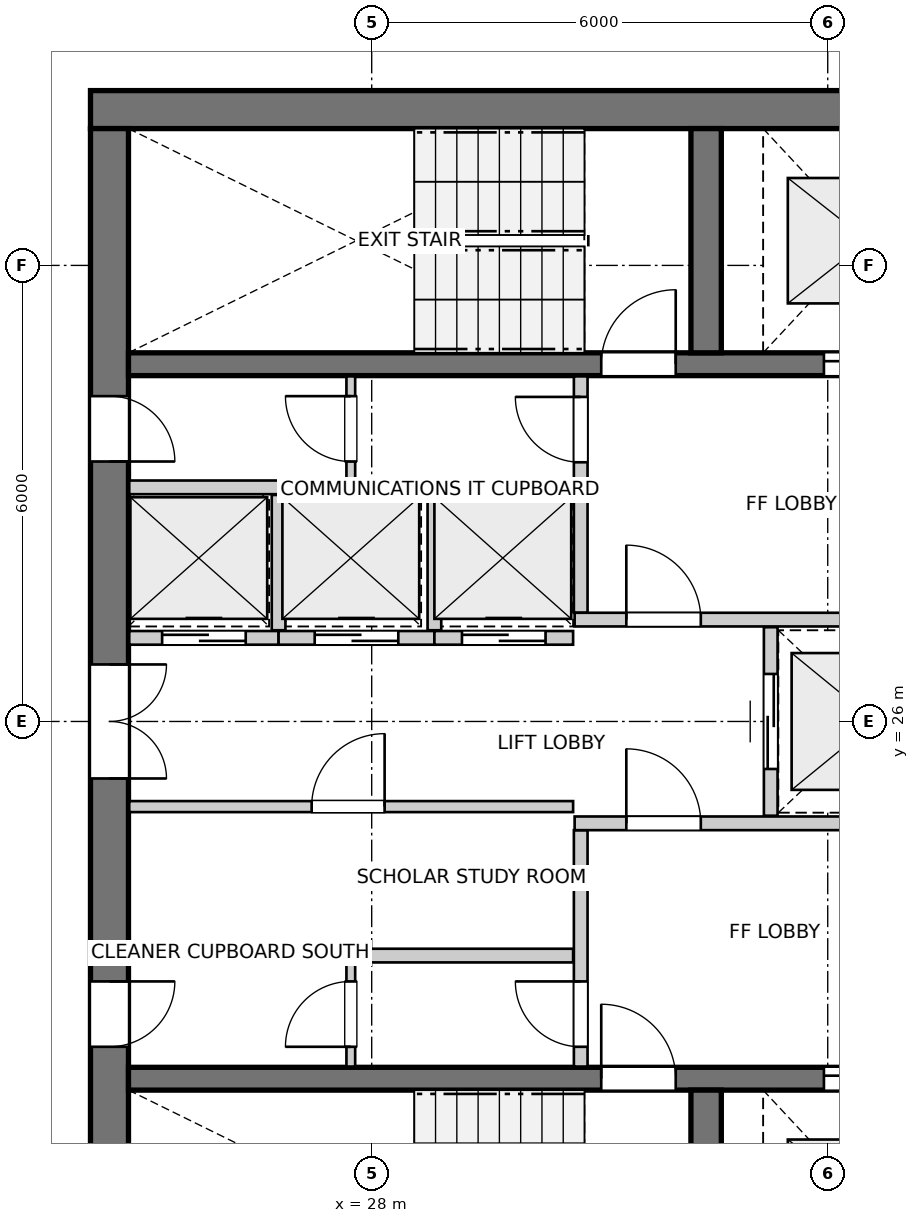
"""IFC4 building model, lengths in metres.
Left out: names, types, materials, properties, quantities, classifications, styles, units other than length and angle.
Written with IfcOpenShell. Run it as: python <this file> out.ifc"""

import sys

from ifc_helpers import new_model, si_unit, direction, frame, frame_2d, origin, place, context, subcontext, project, spatial, rectangle, extrude, source, transform, mapped, element, fill, save


model = new_model("IFC4")
c1 = context("Model", 3, precision=1e-05, world=origin(), true_north=direction((0.0, 1.0)))
c2 = subcontext(c1, "Body", "Model", "MODEL_VIEW")
j1 = project(units=[si_unit("LENGTHUNIT", "METRE"), si_unit("PLANEANGLEUNIT", "RADIAN")], contexts=[c1])
p1 = place(None, origin())
s1 = spatial("IfcSite", under=j1, at=p1, CompositionType="ELEMENT")
p2 = place(p1, origin())
s2 = spatial("IfcBuilding", under=s1, at=p2, CompositionType="ELEMENT")
p3 = place(p2, frame((0.0, 0.0, 234.0)))
s3 = spatial("IfcBuildingStorey", under=s2, at=p3, CompositionType="ELEMENT", Elevation=234.0)
p4 = place(p3, frame((36.4, 34.05, 0.0), z_axis=(0.0, 0.0, 1.0), x_axis=(-1.0, 0.0, 0.0)))
e1 = element("IfcWall", 1, at=p4, inside=s3, PredefinedType="SHEAR", context=c2, shape_type="SweptSolid", body=[
    extrude(rectangle(XDim=12.1, YDim=0.5, at=frame_2d((6.05, 0.0))), origin(), (0.0, 0.0, 1.0), 2.96),
])
p5 = place(p3, frame((24.55, 33.8, 0.0), z_axis=(0.0, 0.0, 1.0), x_axis=(0.0, -1.0, 0.0)))
e2 = element("IfcWall", 2, at=p5, inside=s3, PredefinedType="SHEAR", context=c2, shape_type="SweptSolid", body=[
    extrude(rectangle(XDim=15.6, YDim=0.5, at=frame_2d((7.8, 0.0))), origin(), (0.0, 0.0, 1.0), 2.96),
])
p6 = place(p5, frame((7.05, 0.0, 0.0)))
e3 = element("IfcOpeningElement", 3, at=p6, cuts=e2, PredefinedType="OPENING", context=c2, shape_type="SweptSolid", body=[
    extrude(rectangle(XDim=1.5, YDim=2.15, at=frame_2d((0.75, 1.075))), frame((0.0, 0.26, 0.0), z_axis=(0.0, -1.0, 0.0), x_axis=(1.0, 0.0, 0.0)), (0.0, 0.0, 1.0), 0.52),
])
p7 = place(p5, frame((3.52, 0.0, 0.0)))
e4 = element("IfcOpeningElement", 4, at=p7, cuts=e2, PredefinedType="OPENING", context=c2, shape_type="SweptSolid", body=[
    extrude(rectangle(XDim=0.86, YDim=2.05, at=frame_2d((0.43, 1.025))), frame((0.0, 0.26, 0.0), z_axis=(0.0, -1.0, 0.0), x_axis=(1.0, 0.0, 0.0)), (0.0, 0.0, 1.0), 0.52),
])
p8 = place(p5, frame((11.22, 0.0, 0.0)))
e5 = element("IfcOpeningElement", 5, at=p8, cuts=e2, PredefinedType="OPENING", context=c2, shape_type="SweptSolid", body=[
    extrude(rectangle(XDim=0.86, YDim=2.05, at=frame_2d((0.43, 1.025))), frame((0.0, 0.26, 0.0), z_axis=(0.0, -1.0, 0.0), x_axis=(1.0, 0.0, 0.0)), (0.0, 0.0, 1.0), 0.52),
])
p9 = place(p3, frame((24.8, 21.3, 0.0), z_axis=(0.0, 0.0, 1.0), x_axis=(1.0, 0.0, 0.0)))
e6 = element("IfcWall", 6, at=p9, inside=s3, PredefinedType="SHEAR", context=c2, shape_type="SweptSolid", body=[
    extrude(rectangle(XDim=11.1, YDim=0.3, at=frame_2d((5.55, 0.0))), origin(), (0.0, 0.0, 1.0), 2.96),
])
p10 = place(p9, frame((6.22, 0.0, 0.0)))
e7 = element("IfcOpeningElement", 7, at=p10, cuts=e6, PredefinedType="OPENING", context=c2, shape_type="SweptSolid", body=[
    extrude(rectangle(XDim=0.98, YDim=2.15, at=frame_2d((0.49, 1.075))), frame((0.0, 0.16, 0.0), z_axis=(0.0, -1.0, 0.0), x_axis=(1.0, 0.0, 0.0)), (0.0, 0.0, 1.0), 0.32),
])
p11 = place(p9, frame((9.15, 0.0, 0.0)))
e8 = element("IfcOpeningElement", 8, at=p11, cuts=e6, PredefinedType="OPENING", context=c2, shape_type="SweptSolid", body=[
    extrude(rectangle(XDim=1.15, YDim=2.15, at=frame_2d((0.575, 1.075))), frame((0.0, 0.16, 0.0), z_axis=(0.0, -1.0, 0.0), x_axis=(1.0, 0.0, 0.0)), (0.0, 0.0, 1.0), 0.32),
])
p12 = place(p3, frame((32.4, 18.2, 0.0), z_axis=(0.0, 0.0, 1.0), x_axis=(0.0, 1.0, 0.0)))
e9 = element("IfcWall", 9, at=p12, inside=s3, PredefinedType="SHEAR", context=c2, shape_type="SweptSolid", body=[
    extrude(rectangle(XDim=2.95, YDim=0.4, at=frame_2d((1.475, 0.0))), origin(), (0.0, 0.0, 1.0), 2.96),
])
p13 = place(p3, frame((24.8, 30.7, 0.0), z_axis=(0.0, 0.0, 1.0), x_axis=(1.0, 0.0, 0.0)))
e10 = element("IfcWall", 10, at=p13, inside=s3, PredefinedType="SHEAR", context=c2, shape_type="SweptSolid", body=[
    extrude(rectangle(XDim=11.1, YDim=0.3, at=frame_2d((5.55, 0.0))), origin(), (0.0, 0.0, 1.0), 2.96),
])
p14 = place(p13, frame((6.22, 0.0, 0.0)))
e11 = element("IfcOpeningElement", 11, at=p14, cuts=e10, PredefinedType="OPENING", context=c2, shape_type="SweptSolid", body=[
    extrude(rectangle(XDim=0.98, YDim=2.15, at=frame_2d((0.49, 1.075))), frame((0.0, 0.16, 0.0), z_axis=(0.0, -1.0, 0.0), x_axis=(1.0, 0.0, 0.0)), (0.0, 0.0, 1.0), 0.32),
])
p15 = place(p13, frame((9.15, 0.0, 0.0)))
e12 = element("IfcOpeningElement", 12, at=p15, cuts=e10, PredefinedType="OPENING", context=c2, shape_type="SweptSolid", body=[
    extrude(rectangle(XDim=1.15, YDim=2.15, at=frame_2d((0.575, 1.075))), frame((0.0, 0.16, 0.0), z_axis=(0.0, -1.0, 0.0), x_axis=(1.0, 0.0, 0.0)), (0.0, 0.0, 1.0), 0.32),
])
p16 = place(p3, frame((32.4, 30.85, 0.0), z_axis=(0.0, 0.0, 1.0), x_axis=(0.0, 1.0, 0.0)))
e13 = element("IfcWall", 13, at=p16, inside=s3, PredefinedType="SHEAR", context=c2, shape_type="SweptSolid", body=[
    extrude(rectangle(XDim=2.95, YDim=0.4, at=frame_2d((1.475, 0.0))), origin(), (0.0, 0.0, 1.0), 2.96),
])
p17 = place(p3, frame((30.75, 21.46, 0.0), z_axis=(0.0, 0.0, 1.0), x_axis=(0.0, 1.0, 0.0)))
e14 = element("IfcWall", 14, at=p17, inside=s3, PredefinedType="PARTITIONING", context=c2, shape_type="SweptSolid", body=[
    extrude(rectangle(XDim=3.11, YDim=0.18, at=frame_2d((1.555, 0.0))), origin(), (0.0, 0.0, 1.0), 2.96),
])
p18 = place(p17, frame((0.26, 0.0, 0.0)))
e15 = element("IfcOpeningElement", 15, at=p18, cuts=e14, PredefinedType="OPENING", context=c2, shape_type="SweptSolid", body=[
    extrude(rectangle(XDim=0.86, YDim=2.05, at=frame_2d((0.43, 1.025))), frame((0.0, 0.1, 0.0), z_axis=(0.0, -1.0, 0.0), x_axis=(1.0, 0.0, 0.0)), (0.0, 0.0, 1.0), 0.2),
])
p19 = place(p3, frame((30.67, 24.66, 0.0), z_axis=(0.0, 0.0, 1.0), x_axis=(1.0, 0.0, 0.0)))
e16 = element("IfcWall", 16, at=p19, inside=s3, PredefinedType="PARTITIONING", context=c2, shape_type="SweptSolid", body=[
    extrude(rectangle(XDim=5.22, YDim=0.18, at=frame_2d((2.61, 0.0))), origin(), (0.0, 0.0, 1.0), 2.96),
])
p20 = place(p19, frame((0.68, 0.0, 0.0)))
e17 = element("IfcOpeningElement", 17, at=p20, cuts=e16, PredefinedType="OPENING", context=c2, shape_type="SweptSolid", body=[
    extrude(rectangle(XDim=0.98, YDim=2.15, at=frame_2d((0.49, 1.075))), frame((0.0, 0.1, 0.0), z_axis=(0.0, -1.0, 0.0), x_axis=(1.0, 0.0, 0.0)), (0.0, 0.0, 1.0), 0.2),
])
p21 = place(p3, frame((30.75, 27.43, 0.0), z_axis=(0.0, 0.0, 1.0), x_axis=(0.0, 1.0, 0.0)))
e18 = element("IfcWall", 18, at=p21, inside=s3, PredefinedType="PARTITIONING", context=c2, shape_type="SweptSolid", body=[
    extrude(rectangle(XDim=3.11, YDim=0.18, at=frame_2d((1.555, 0.0))), origin(), (0.0, 0.0, 1.0), 2.96),
])
p22 = place(p21, frame((1.98, 0.0, 0.0)))
e19 = element("IfcOpeningElement", 19, at=p22, cuts=e18, PredefinedType="OPENING", context=c2, shape_type="SweptSolid", body=[
    extrude(rectangle(XDim=0.86, YDim=2.05, at=frame_2d((0.43, 1.025))), frame((0.0, 0.1, 0.0), z_axis=(0.0, -1.0, 0.0), x_axis=(1.0, 0.0, 0.0)), (0.0, 0.0, 1.0), 0.2),
])
p23 = place(p3, frame((30.67, 27.34, 0.0), z_axis=(0.0, 0.0, 1.0), x_axis=(1.0, 0.0, 0.0)))
e20 = element("IfcWall", 20, at=p23, inside=s3, PredefinedType="PARTITIONING", context=c2, shape_type="SweptSolid", body=[
    extrude(rectangle(XDim=5.22, YDim=0.18, at=frame_2d((2.61, 0.0))), origin(), (0.0, 0.0, 1.0), 2.96),
])
p24 = place(p23, frame((0.68, 0.0, 0.0)))
e21 = element("IfcOpeningElement", 21, at=p24, cuts=e20, PredefinedType="OPENING", context=c2, shape_type="SweptSolid", body=[
    extrude(rectangle(XDim=0.98, YDim=2.15, at=frame_2d((0.49, 1.075))), frame((0.0, 0.1, 0.0), z_axis=(0.0, -1.0, 0.0), x_axis=(1.0, 0.0, 0.0)), (0.0, 0.0, 1.0), 0.2),
])
p25 = place(p3, frame((33.25, 24.76, 0.0), z_axis=(0.0, 0.0, 1.0), x_axis=(0.0, 1.0, 0.0)))
e22 = element("IfcWall", 22, at=p25, inside=s3, PredefinedType="PARTITIONING", context=c2, shape_type="SweptSolid", body=[
    extrude(rectangle(XDim=2.48, YDim=0.18, at=frame_2d((1.24, 0.0))), origin(), (0.0, 0.0, 1.0), 2.96),
])
p26 = place(p25, frame((0.615, 0.0, 0.0)))
e23 = element("IfcOpeningElement", 23, at=p26, cuts=e22, PredefinedType="OPENING", context=c2, shape_type="SweptSolid", body=[
    extrude(rectangle(XDim=1.25, YDim=2.15, at=frame_2d((0.625, 1.075))), frame((0.0, 0.1, 0.0), z_axis=(0.0, -1.0, 0.0), x_axis=(1.0, 0.0, 0.0)), (0.0, 0.0, 1.0), 0.2),
])
p27 = place(p3, frame((24.81, 22.92, 0.0), z_axis=(0.0, 0.0, 1.0), x_axis=(1.0, 0.0, 0.0)))
e24 = element("IfcWall", 24, at=p27, inside=s3, PredefinedType="PARTITIONING", context=c2, shape_type="SweptSolid", body=[
    extrude(rectangle(XDim=5.84, YDim=0.18, at=frame_2d((2.92, 0.0))), origin(), (0.0, 0.0, 1.0), 2.96),
])
p28 = place(p3, frame((24.81, 24.88, 0.0), z_axis=(0.0, 0.0, 1.0), x_axis=(1.0, 0.0, 0.0)))
e25 = element("IfcWall", 25, at=p28, inside=s3, PredefinedType="PARTITIONING", context=c2, shape_type="SweptSolid", body=[
    extrude(rectangle(XDim=5.84, YDim=0.145, at=frame_2d((2.92, 0.0))), origin(), (0.0, 0.0, 1.0), 2.96),
])
p29 = place(p28, frame((2.4, 0.0, 0.0)))
e26 = element("IfcOpeningElement", 26, at=p29, cuts=e25, PredefinedType="OPENING", context=c2, shape_type="SweptSolid", body=[
    extrude(rectangle(XDim=0.96, YDim=2.1, at=frame_2d((0.48, 1.05))), frame((0.0, 0.083, 0.0), z_axis=(0.0, -1.0, 0.0), x_axis=(1.0, 0.0, 0.0)), (0.0, 0.0, 1.0), 0.165),
])
p30 = place(p3, frame((24.81, 29.08, 0.0), z_axis=(0.0, 0.0, 1.0), x_axis=(1.0, 0.0, 0.0)))
e27 = element("IfcWall", 27, at=p30, inside=s3, PredefinedType="PARTITIONING", context=c2, shape_type="SweptSolid", body=[
    extrude(rectangle(XDim=5.84, YDim=0.18, at=frame_2d((2.92, 0.0))), origin(), (0.0, 0.0, 1.0), 2.96),
])
p31 = place(p3, frame((24.81, 27.1, 0.0), z_axis=(0.0, 0.0, 1.0), x_axis=(1.0, 0.0, 0.0)))
e28 = element("IfcWall", 28, at=p31, inside=s3, PredefinedType="PARTITIONING", context=c2, shape_type="SweptSolid", body=[
    extrude(rectangle(XDim=1.965, YDim=0.18, at=frame_2d((0.982, 0.0))), origin(), (0.0, 0.0, 1.0), 2.96),
])
p32 = place(p31, frame((0.433, 0.0, 0.0)))
e29 = element("IfcOpeningElement", 29, at=p32, cuts=e28, PredefinedType="OPENING", context=c2, shape_type="SweptSolid", body=[
    extrude(rectangle(XDim=1.1, YDim=2.15, at=frame_2d((0.55, 1.075))), frame((0.0, 0.1, 0.0), z_axis=(0.0, -1.0, 0.0), x_axis=(1.0, 0.0, 0.0)), (0.0, 0.0, 1.0), 0.2),
])
p33 = place(p3, frame((26.775, 27.1, 0.0), z_axis=(0.0, 0.0, 1.0), x_axis=(1.0, 0.0, 0.0)))
e30 = element("IfcWall", 30, at=p33, inside=s3, PredefinedType="PARTITIONING", context=c2, shape_type="SweptSolid", body=[
    extrude(rectangle(XDim=2.05, YDim=0.18, at=frame_2d((1.025, 0.0))), origin(), (0.0, 0.0, 1.0), 2.96),
])
p34 = place(p33, frame((0.475, 0.0, 0.0)))
e31 = element("IfcOpeningElement", 31, at=p34, cuts=e30, PredefinedType="OPENING", context=c2, shape_type="SweptSolid", body=[
    extrude(rectangle(XDim=1.1, YDim=2.15, at=frame_2d((0.55, 1.075))), frame((0.0, 0.1, 0.0), z_axis=(0.0, -1.0, 0.0), x_axis=(1.0, 0.0, 0.0)), (0.0, 0.0, 1.0), 0.2),
])
p35 = place(p3, frame((26.775, 27.2, 0.0), z_axis=(0.0, 0.0, 1.0), x_axis=(0.0, 1.0, 0.0)))
e32 = element("IfcWall", 32, at=p35, inside=s3, PredefinedType="PARTITIONING", context=c2, shape_type="SweptSolid", body=[
    extrude(rectangle(XDim=1.78, YDim=0.18, at=frame_2d((0.89, 0.0))), origin(), (0.0, 0.0, 1.0), 2.96),
])
p36 = place(p3, frame((28.825, 27.1, 0.0), z_axis=(0.0, 0.0, 1.0), x_axis=(1.0, 0.0, 0.0)))
e33 = element("IfcWall", 33, at=p36, inside=s3, PredefinedType="PARTITIONING", context=c2, shape_type="SweptSolid", body=[
    extrude(rectangle(XDim=1.825, YDim=0.18, at=frame_2d((0.913, 0.0))), origin(), (0.0, 0.0, 1.0), 2.96),
])
p37 = place(p36, frame((0.363, 0.0, 0.0)))
e34 = element("IfcOpeningElement", 34, at=p37, cuts=e33, PredefinedType="OPENING", context=c2, shape_type="SweptSolid", body=[
    extrude(rectangle(XDim=1.1, YDim=2.15, at=frame_2d((0.55, 1.075))), frame((0.0, 0.1, 0.0), z_axis=(0.0, -1.0, 0.0), x_axis=(1.0, 0.0, 0.0)), (0.0, 0.0, 1.0), 0.2),
])
p38 = place(p3, frame((28.825, 27.2, 0.0), z_axis=(0.0, 0.0, 1.0), x_axis=(0.0, 1.0, 0.0)))
e35 = element("IfcWall", 35, at=p38, inside=s3, PredefinedType="PARTITIONING", context=c2, shape_type="SweptSolid", body=[
    extrude(rectangle(XDim=1.78, YDim=0.18, at=frame_2d((0.89, 0.0))), origin(), (0.0, 0.0, 1.0), 2.96),
])
p39 = place(p3, frame((27.725, 21.46, 0.0), z_axis=(0.0, 0.0, 1.0), x_axis=(0.0, 1.0, 0.0)))
e36 = element("IfcWall", 36, at=p39, inside=s3, PredefinedType="PARTITIONING", context=c2, shape_type="SweptSolid", body=[
    extrude(rectangle(XDim=1.38, YDim=0.115, at=frame_2d((0.69, 0.0))), origin(), (0.0, 0.0, 1.0), 2.96),
])
p40 = place(p39, frame((0.26, 0.0, 0.0)))
e37 = element("IfcOpeningElement", 37, at=p40, cuts=e36, PredefinedType="OPENING", context=c2, shape_type="SweptSolid", body=[
    extrude(rectangle(XDim=0.86, YDim=2.05, at=frame_2d((0.43, 1.025))), frame((0.0, 0.067, 0.0), z_axis=(0.0, -1.0, 0.0), x_axis=(1.0, 0.0, 0.0)), (0.0, 0.0, 1.0), 0.135),
])
p41 = place(p3, frame((27.725, 29.16, 0.0), z_axis=(0.0, 0.0, 1.0), x_axis=(0.0, 1.0, 0.0)))
e38 = element("IfcWall", 38, at=p41, inside=s3, PredefinedType="PARTITIONING", context=c2, shape_type="SweptSolid", body=[
    extrude(rectangle(XDim=1.38, YDim=0.115, at=frame_2d((0.69, 0.0))), origin(), (0.0, 0.0, 1.0), 2.96),
])
p42 = place(p41, frame((0.26, 0.0, 0.0)))
e39 = element("IfcOpeningElement", 39, at=p42, cuts=e38, PredefinedType="OPENING", context=c2, shape_type="SweptSolid", body=[
    extrude(rectangle(XDim=0.86, YDim=2.05, at=frame_2d((0.43, 1.025))), frame((0.0, 0.067, 0.0), z_axis=(0.0, -1.0, 0.0), x_axis=(1.0, 0.0, 0.0)), (0.0, 0.0, 1.0), 0.135),
])
m1 = source(origin(), c2, "Body", "SweptSolid", [
    extrude(rectangle(XDim=0.98, YDim=2.15, at=frame_2d((0.49, 1.075))), frame((0.0, 0.025, 0.0), z_axis=(0.0, -1.0, 0.0), x_axis=(1.0, 0.0, 0.0)), (0.0, 0.0, 1.0), 0.05),
])
p43 = place(p10, origin())
e40 = element("IfcDoor", 40, at=p43, inside=s3, OperationType="SINGLE_SWING_LEFT", PredefinedType="DOOR", context=c2, shape_type="MappedRepresentation", body=[
    mapped(m1, transform((0.0, 0.0, 0.0), x_axis=(1.0, 0.0, 0.0), y_axis=(0.0, 1.0, 0.0), z_axis=(0.0, 0.0, 1.0), scale=1.0)),
])
fill(e7, e40)
m2 = source(origin(), c2, "Body", "SweptSolid", [
    extrude(rectangle(XDim=1.15, YDim=2.15, at=frame_2d((0.575, 1.075))), frame((0.0, 0.025, 0.0), z_axis=(0.0, -1.0, 0.0), x_axis=(1.0, 0.0, 0.0)), (0.0, 0.0, 1.0), 0.05),
])
p44 = place(p11, origin())
e41 = element("IfcDoor", 41, at=p44, inside=s3, OperationType="DOUBLE_DOOR_SLIDING", PredefinedType="DOOR", context=c2, shape_type="MappedRepresentation", body=[
    mapped(m2, transform((0.0, 0.0, 0.0), x_axis=(1.0, 0.0, 0.0), y_axis=(0.0, 1.0, 0.0), z_axis=(0.0, 0.0, 1.0), scale=1.0)),
])
fill(e8, e41)
p45 = place(p14, origin())
e42 = element("IfcDoor", 42, at=p45, inside=s3, OperationType="SINGLE_SWING_RIGHT", PredefinedType="DOOR", context=c2, shape_type="MappedRepresentation", body=[
    mapped(m1, transform((0.0, 0.0, 0.0), x_axis=(1.0, 0.0, 0.0), y_axis=(0.0, 1.0, 0.0), z_axis=(0.0, 0.0, 1.0), scale=1.0)),
])
fill(e11, e42)
p46 = place(p15, origin())
e43 = element("IfcDoor", 43, at=p46, inside=s3, OperationType="DOUBLE_DOOR_SLIDING", PredefinedType="DOOR", context=c2, shape_type="MappedRepresentation", body=[
    mapped(m2, transform((0.0, 0.0, 0.0), x_axis=(1.0, 0.0, 0.0), y_axis=(0.0, 1.0, 0.0), z_axis=(0.0, 0.0, 1.0), scale=1.0)),
])
fill(e12, e43)
m3 = source(origin(), c2, "Body", "SweptSolid", [
    extrude(rectangle(XDim=1.5, YDim=2.15, at=frame_2d((0.75, 1.075))), frame((0.0, 0.025, 0.0), z_axis=(0.0, -1.0, 0.0), x_axis=(1.0, 0.0, 0.0)), (0.0, 0.0, 1.0), 0.05),
])
p47 = place(p6, origin())
e44 = element("IfcDoor", 44, at=p47, inside=s3, OperationType="DOUBLE_DOOR_SINGLE_SWING", PredefinedType="DOOR", context=c2, shape_type="MappedRepresentation", body=[
    mapped(m3, transform((0.0, 0.0, 0.0), x_axis=(1.0, 0.0, 0.0), y_axis=(0.0, 1.0, 0.0), z_axis=(0.0, 0.0, 1.0), scale=1.0)),
])
fill(e3, e44)
m4 = source(origin(), c2, "Body", "SweptSolid", [
    extrude(rectangle(XDim=0.86, YDim=2.05, at=frame_2d((0.43, 1.025))), frame((0.0, 0.025, 0.0), z_axis=(0.0, -1.0, 0.0), x_axis=(1.0, 0.0, 0.0)), (0.0, 0.0, 1.0), 0.05),
])
p48 = place(p7, origin())
e45 = element("IfcDoor", 45, at=p48, inside=s3, OperationType="SINGLE_SWING_RIGHT", PredefinedType="DOOR", context=c2, shape_type="MappedRepresentation", body=[
    mapped(m4, transform((0.0, 0.0, 0.0), x_axis=(1.0, 0.0, 0.0), y_axis=(0.0, 1.0, 0.0), z_axis=(0.0, 0.0, 1.0), scale=1.0)),
])
fill(e4, e45)
p49 = place(p8, origin())
e46 = element("IfcDoor", 46, at=p49, inside=s3, OperationType="SINGLE_SWING_LEFT", PredefinedType="DOOR", context=c2, shape_type="MappedRepresentation", body=[
    mapped(m4, transform((0.0, 0.0, 0.0), x_axis=(1.0, 0.0, 0.0), y_axis=(0.0, 1.0, 0.0), z_axis=(0.0, 0.0, 1.0), scale=1.0)),
])
fill(e5, e46)
p50 = place(p18, origin())
e47 = element("IfcDoor", 47, at=p50, inside=s3, OperationType="SINGLE_SWING_RIGHT", PredefinedType="DOOR", context=c2, shape_type="MappedRepresentation", body=[
    mapped(m4, transform((0.0, 0.0, 0.0), x_axis=(1.0, 0.0, 0.0), y_axis=(0.0, 1.0, 0.0), z_axis=(0.0, 0.0, 1.0), scale=1.0)),
])
fill(e15, e47)
p51 = place(p20, origin())
e48 = element("IfcDoor", 48, at=p51, inside=s3, OperationType="SINGLE_SWING_LEFT", PredefinedType="DOOR", context=c2, shape_type="MappedRepresentation", body=[
    mapped(m1, transform((0.0, 0.0, 0.0), x_axis=(1.0, 0.0, 0.0), y_axis=(0.0, 1.0, 0.0), z_axis=(0.0, 0.0, 1.0), scale=1.0)),
])
fill(e17, e48)
p52 = place(p22, origin())
e49 = element("IfcDoor", 49, at=p52, inside=s3, OperationType="SINGLE_SWING_RIGHT", PredefinedType="DOOR", context=c2, shape_type="MappedRepresentation", body=[
    mapped(m4, transform((0.0, 0.0, 0.0), x_axis=(1.0, 0.0, 0.0), y_axis=(0.0, 1.0, 0.0), z_axis=(0.0, 0.0, 1.0), scale=1.0)),
])
fill(e19, e49)
p53 = place(p24, origin())
e50 = element("IfcDoor", 50, at=p53, inside=s3, OperationType="SINGLE_SWING_LEFT", PredefinedType="DOOR", context=c2, shape_type="MappedRepresentation", body=[
    mapped(m1, transform((0.0, 0.0, 0.0), x_axis=(1.0, 0.0, 0.0), y_axis=(0.0, 1.0, 0.0), z_axis=(0.0, 0.0, 1.0), scale=1.0)),
])
fill(e21, e50)
m5 = source(origin(), c2, "Body", "SweptSolid", [
    extrude(rectangle(XDim=1.25, YDim=2.15, at=frame_2d((0.625, 1.075))), frame((0.0, 0.025, 0.0), z_axis=(0.0, -1.0, 0.0), x_axis=(1.0, 0.0, 0.0)), (0.0, 0.0, 1.0), 0.05),
])
p54 = place(p26, origin())
e51 = element("IfcDoor", 51, at=p54, inside=s3, OperationType="DOUBLE_DOOR_SLIDING", PredefinedType="DOOR", context=c2, shape_type="MappedRepresentation", body=[
    mapped(m5, transform((0.0, 0.0, 0.0), x_axis=(1.0, 0.0, 0.0), y_axis=(0.0, 1.0, 0.0), z_axis=(0.0, 0.0, 1.0), scale=1.0)),
])
fill(e23, e51)
m6 = source(origin(), c2, "Body", "SweptSolid", [
    extrude(rectangle(XDim=0.96, YDim=2.1, at=frame_2d((0.48, 1.05))), frame((0.0, 0.025, 0.0), z_axis=(0.0, -1.0, 0.0), x_axis=(1.0, 0.0, 0.0)), (0.0, 0.0, 1.0), 0.05),
])
p55 = place(p29, origin())
e52 = element("IfcDoor", 52, at=p55, inside=s3, OperationType="SINGLE_SWING_RIGHT", PredefinedType="DOOR", context=c2, shape_type="MappedRepresentation", body=[
    mapped(m6, transform((0.0, 0.0, 0.0), x_axis=(1.0, 0.0, 0.0), y_axis=(0.0, 1.0, 0.0), z_axis=(0.0, 0.0, 1.0), scale=1.0)),
])
fill(e26, e52)
m7 = source(origin(), c2, "Body", "SweptSolid", [
    extrude(rectangle(XDim=1.1, YDim=2.15, at=frame_2d((0.55, 1.075))), frame((0.0, 0.025, 0.0), z_axis=(0.0, -1.0, 0.0), x_axis=(1.0, 0.0, 0.0)), (0.0, 0.0, 1.0), 0.05),
])
p56 = place(p32, origin())
e53 = element("IfcDoor", 53, at=p56, inside=s3, OperationType="DOUBLE_DOOR_SLIDING", PredefinedType="DOOR", context=c2, shape_type="MappedRepresentation", body=[
    mapped(m7, transform((0.0, 0.0, 0.0), x_axis=(1.0, 0.0, 0.0), y_axis=(0.0, 1.0, 0.0), z_axis=(0.0, 0.0, 1.0), scale=1.0)),
])
fill(e29, e53)
p57 = place(p34, origin())
e54 = element("IfcDoor", 54, at=p57, inside=s3, OperationType="DOUBLE_DOOR_SLIDING", PredefinedType="DOOR", context=c2, shape_type="MappedRepresentation", body=[
    mapped(m7, transform((0.0, 0.0, 0.0), x_axis=(1.0, 0.0, 0.0), y_axis=(0.0, 1.0, 0.0), z_axis=(0.0, 0.0, 1.0), scale=1.0)),
])
fill(e31, e54)
p58 = place(p37, origin())
e55 = element("IfcDoor", 55, at=p58, inside=s3, OperationType="DOUBLE_DOOR_SLIDING", PredefinedType="DOOR", context=c2, shape_type="MappedRepresentation", body=[
    mapped(m7, transform((0.0, 0.0, 0.0), x_axis=(1.0, 0.0, 0.0), y_axis=(0.0, 1.0, 0.0), z_axis=(0.0, 0.0, 1.0), scale=1.0)),
])
fill(e34, e55)
p59 = place(p40, origin())
e56 = element("IfcDoor", 56, at=p59, inside=s3, OperationType="SINGLE_SWING_LEFT", PredefinedType="DOOR", context=c2, shape_type="MappedRepresentation", body=[
    mapped(m4, transform((0.0, 0.0, 0.0), x_axis=(1.0, 0.0, 0.0), y_axis=(0.0, 1.0, 0.0), z_axis=(0.0, 0.0, 1.0), scale=1.0)),
])
fill(e37, e56)
p60 = place(p42, origin())
e57 = element("IfcDoor", 57, at=p60, inside=s3, OperationType="SINGLE_SWING_RIGHT", PredefinedType="DOOR", context=c2, shape_type="MappedRepresentation", body=[
    mapped(m4, transform((0.0, 0.0, 0.0), x_axis=(1.0, 0.0, 0.0), y_axis=(0.0, 1.0, 0.0), z_axis=(0.0, 0.0, 1.0), scale=1.0)),
])
fill(e39, e57)
save(model, sys.argv[1])
